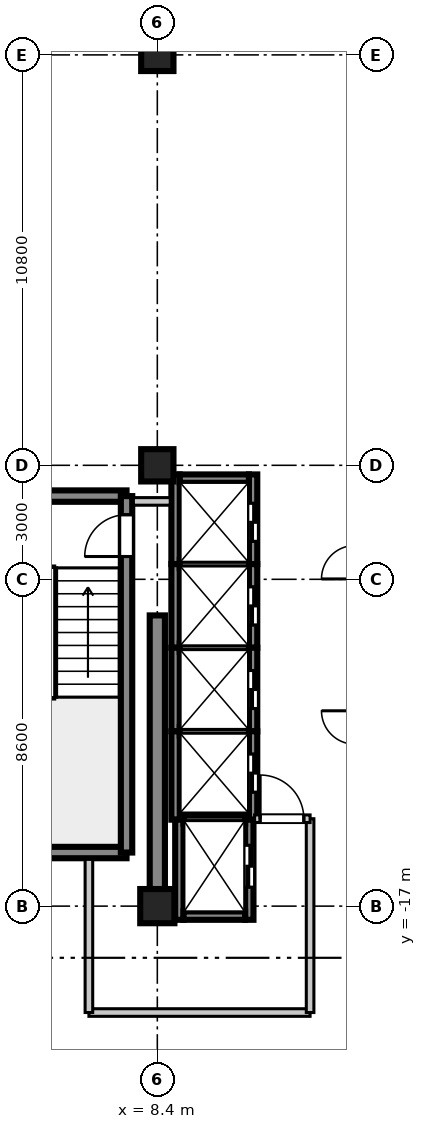
"""IFC4 building model, lengths in metres.
Left out: names, types, materials, properties, quantities, classifications, styles, units other than length and angle.
Written with IfcOpenShell. Run it as: python <this file> out.ifc"""

import sys

from ifc_helpers import new_model, si_unit, direction, frame, frame_2d, origin, origin_2d, place, context, subcontext, project, spatial, rectangle, extrude, source, transform, mapped, element, fill, save


model = new_model("IFC4")
c1 = context("Model", 3, precision=1e-05, world=origin(), true_north=direction((0.0, 1.0)))
c2 = subcontext(c1, "Body", "Model", "MODEL_VIEW")
j1 = project(units=[si_unit("LENGTHUNIT", "METRE"), si_unit("PLANEANGLEUNIT", "RADIAN")], contexts=[c1])
p1 = place(None, origin())
s1 = spatial("IfcSite", under=j1, at=p1, CompositionType="ELEMENT")
p2 = place(p1, origin())
s2 = spatial("IfcBuilding", under=s1, at=p2, CompositionType="ELEMENT")
p3 = place(p2, frame((0.0, 0.0, 266.3)))
s3 = spatial("IfcBuildingStorey", under=s2, at=p3, CompositionType="ELEMENT", Elevation=266.3)
m1 = source(origin(), c2, "Body", "SweptSolid", [
    extrude(rectangle(XDim=0.9, YDim=0.9, at=origin_2d()), origin(), (0.0, 0.0, 1.0), 3.705),
])
p4 = place(p3, frame((8.4, -17.0, 0.0), z_axis=(0.0, 0.0, 1.0), x_axis=(1.0, 0.0, 0.0)))
e1 = element("IfcColumn", 1, at=p4, inside=s3, PredefinedType="COLUMN", context=c2, shape_type="MappedRepresentation", body=[
    mapped(m1, transform((0.0, 0.0, 0.0), scale=1.0)),
])
m2 = source(origin(), c2, "Body", "SweptSolid", [
    extrude(rectangle(XDim=0.85, YDim=0.85, at=origin_2d()), origin(), (0.0, 0.0, 1.0), 3.705),
])
for number, where, z_axis, x_axis in (
    (2, (8.4, -5.4, 0.0), (0.0, 0.0, 1.0), (1.0, 0.0, 0.0)),
    (3, (8.4, 5.4, 0.0), (0.0, 0.0, 1.0), (1.0, 0.0, 0.0)),
):
    element("IfcColumn", number, at=place(p3, frame(where, z_axis=z_axis, x_axis=x_axis)), inside=s3, PredefinedType="PILASTER", context=c2, shape_type="MappedRepresentation", body=[
        mapped(m2, transform((0.0, 0.0, 0.0), scale=1.0)),
    ])
m3 = source(origin(), c2, "Body", "SweptSolid", [
    extrude(rectangle(XDim=7.65, YDim=0.4, at=frame_2d((3.825, 0.0))), origin(), (0.0, 0.0, 1.0), 3.45),
])
p5 = place(p3, frame((8.4, -17.0, 0.0), z_axis=(0.0, 0.0, 1.0), x_axis=(0.0, 1.0, 0.0)))
e4 = element("IfcWall", 4, at=p5, inside=s3, PredefinedType="SHEAR", context=c2, shape_type="MappedRepresentation", body=[
    mapped(m3, transform((0.0, 0.0, 0.0), scale=1.0)),
])
m4 = source(origin(), c2, "Body", "SweptSolid", [
    extrude(rectangle(XDim=3.98, YDim=0.3, at=frame_2d((1.99, 0.0))), origin(), (0.0, 0.0, 1.0), 3.45),
])
for number, where, z_axis, x_axis in (
    (5, (3.61, -15.59, 0.0), (0.0, 0.0, 1.0), (1.0, 0.0, 0.0)),
    (6, (3.61, -6.21, 0.0), (0.0, 0.0, 1.0), (1.0, 0.0, 0.0)),
):
    element("IfcWall", number, at=place(p3, frame(where, z_axis=z_axis, x_axis=x_axis)), inside=s3, PredefinedType="SHEAR", context=c2, shape_type="MappedRepresentation", body=[
        mapped(m4, transform((0.0, 0.0, 0.0), scale=1.0)),
    ])
m5 = source(origin(), c2, "Body", "SweptSolid", [
    extrude(rectangle(XDim=9.38, YDim=0.3, at=frame_2d((4.69, 0.0))), origin(), (0.0, 0.0, 1.0), 3.45),
])
p6 = place(p3, frame((7.59, -15.59, 0.0), z_axis=(0.0, 0.0, 1.0), x_axis=(0.0, 1.0, 0.0)))
e7 = element("IfcWall", 7, at=p6, inside=s3, PredefinedType="SHEAR", context=c2, shape_type="MappedRepresentation", body=[
    mapped(m5, transform((0.0, 0.0, 0.0), scale=1.0)),
])
p7 = place(p6, frame((7.79, 0.0, 0.0)))
e8 = element("IfcOpeningElement", 8, at=p7, cuts=e7, PredefinedType="OPENING", context=c2, shape_type="SweptSolid", body=[
    extrude(rectangle(XDim=1.1, YDim=2.15, at=frame_2d((0.55, 1.075))), frame((0.0, 0.16, 0.0), z_axis=(0.0, -1.0, 0.0), x_axis=(1.0, 0.0, 0.0)), (0.0, 0.0, 1.0), 0.32),
])
m6 = source(origin(), c2, "Body", "SweptSolid", [
    extrude(rectangle(XDim=2.36, YDim=0.22, at=frame_2d((1.18, 0.0))), origin(), (0.0, 0.0, 1.0), 3.45),
])
p8 = place(p3, frame((8.88, -8.0, 0.0), z_axis=(0.0, 0.0, 1.0), x_axis=(0.0, 1.0, 0.0)))
e9 = element("IfcWall", 9, at=p8, inside=s3, PredefinedType="SHEAR", context=c2, shape_type="MappedRepresentation", body=[
    mapped(m6, transform((0.0, 0.0, 0.0), scale=1.0)),
])
p9 = place(p3, frame((10.92, -8.0, 0.0), z_axis=(0.0, 0.0, 1.0), x_axis=(0.0, 1.0, 0.0)))
e10 = element("IfcWall", 10, at=p9, inside=s3, PredefinedType="SHEAR", context=c2, shape_type="MappedRepresentation", body=[
    mapped(m6, transform((0.0, 0.0, 0.0), scale=1.0)),
])
p10 = place(p9, frame((0.6, 0.0, 0.0)))
e11 = element("IfcOpeningElement", 11, at=p10, cuts=e10, PredefinedType="OPENING", context=c2, shape_type="SweptSolid", body=[
    extrude(rectangle(XDim=1.0, YDim=2.2, at=frame_2d((0.5, 1.1))), frame((0.0, 0.12, 0.0), z_axis=(0.0, -1.0, 0.0), x_axis=(1.0, 0.0, 0.0)), (0.0, 0.0, 1.0), 0.24),
])
m7 = source(origin(), c2, "Body", "SweptSolid", [
    extrude(rectangle(XDim=1.82, YDim=0.22, at=frame_2d((0.91, 0.0))), origin(), (0.0, 0.0, 1.0), 3.45),
])
p11 = place(p3, frame((8.99, -5.75, 0.0), z_axis=(0.0, 0.0, 1.0), x_axis=(1.0, 0.0, 0.0)))
e12 = element("IfcWall", 12, at=p11, inside=s3, PredefinedType="SHEAR", context=c2, shape_type="MappedRepresentation", body=[
    mapped(m7, transform((0.0, 0.0, 0.0), scale=1.0)),
])
m8 = source(origin(), c2, "Body", "SweptSolid", [
    extrude(rectangle(XDim=2.2, YDim=0.22, at=frame_2d((1.1, 0.0))), origin(), (0.0, 0.0, 1.0), 3.45),
])
p12 = place(p3, frame((8.88, -10.2, 0.0), z_axis=(0.0, 0.0, 1.0), x_axis=(0.0, 1.0, 0.0)))
e13 = element("IfcWall", 13, at=p12, inside=s3, PredefinedType="SHEAR", context=c2, shape_type="MappedRepresentation", body=[
    mapped(m8, transform((0.0, 0.0, 0.0), scale=1.0)),
])
p13 = place(p3, frame((10.92, -10.2, 0.0), z_axis=(0.0, 0.0, 1.0), x_axis=(0.0, 1.0, 0.0)))
e14 = element("IfcWall", 14, at=p13, inside=s3, PredefinedType="SHEAR", context=c2, shape_type="MappedRepresentation", body=[
    mapped(m8, transform((0.0, 0.0, 0.0), scale=1.0)),
])
p14 = place(p13, frame((0.6, 0.0, 0.0)))
e15 = element("IfcOpeningElement", 15, at=p14, cuts=e14, PredefinedType="OPENING", context=c2, shape_type="SweptSolid", body=[
    extrude(rectangle(XDim=1.0, YDim=2.2, at=frame_2d((0.5, 1.1))), frame((0.0, 0.12, 0.0), z_axis=(0.0, -1.0, 0.0), x_axis=(1.0, 0.0, 0.0)), (0.0, 0.0, 1.0), 0.24),
])
m9 = source(origin(), c2, "Body", "SweptSolid", [
    extrude(rectangle(XDim=1.82, YDim=0.22, at=frame_2d((0.91, 0.0))), origin(), (0.0, 0.0, 1.0), 3.75),
])
p15 = place(p3, frame((8.99, -8.0, 0.0), z_axis=(0.0, 0.0, 1.0), x_axis=(1.0, 0.0, 0.0)))
e16 = element("IfcWall", 16, at=p15, inside=s3, PredefinedType="SHEAR", context=c2, shape_type="MappedRepresentation", body=[
    mapped(m9, transform((0.0, 0.0, 0.0), scale=1.0)),
])
p16 = place(p3, frame((8.88, -12.4, 0.0), z_axis=(0.0, 0.0, 1.0), x_axis=(0.0, 1.0, 0.0)))
e17 = element("IfcWall", 17, at=p16, inside=s3, PredefinedType="SHEAR", context=c2, shape_type="MappedRepresentation", body=[
    mapped(m8, transform((0.0, 0.0, 0.0), scale=1.0)),
])
p17 = place(p3, frame((10.92, -12.4, 0.0), z_axis=(0.0, 0.0, 1.0), x_axis=(0.0, 1.0, 0.0)))
e18 = element("IfcWall", 18, at=p17, inside=s3, PredefinedType="SHEAR", context=c2, shape_type="MappedRepresentation", body=[
    mapped(m8, transform((0.0, 0.0, 0.0), scale=1.0)),
])
p18 = place(p17, frame((0.6, 0.0, 0.0)))
e19 = element("IfcOpeningElement", 19, at=p18, cuts=e18, PredefinedType="OPENING", context=c2, shape_type="SweptSolid", body=[
    extrude(rectangle(XDim=1.0, YDim=2.2, at=frame_2d((0.5, 1.1))), frame((0.0, 0.12, 0.0), z_axis=(0.0, -1.0, 0.0), x_axis=(1.0, 0.0, 0.0)), (0.0, 0.0, 1.0), 0.24),
])
p19 = place(p3, frame((8.99, -10.2, 0.0), z_axis=(0.0, 0.0, 1.0), x_axis=(1.0, 0.0, 0.0)))
e20 = element("IfcWall", 20, at=p19, inside=s3, PredefinedType="SHEAR", context=c2, shape_type="MappedRepresentation", body=[
    mapped(m9, transform((0.0, 0.0, 0.0), scale=1.0)),
])
m10 = source(origin(), c2, "Body", "SweptSolid", [
    extrude(rectangle(XDim=2.325, YDim=0.22, at=frame_2d((1.163, 0.0))), origin(), (0.0, 0.0, 1.0), 3.45),
])
p20 = place(p3, frame((8.88, -14.725, 0.0), z_axis=(0.0, 0.0, 1.0), x_axis=(0.0, 1.0, 0.0)))
e21 = element("IfcWall", 21, at=p20, inside=s3, PredefinedType="SHEAR", context=c2, shape_type="MappedRepresentation", body=[
    mapped(m10, transform((0.0, 0.0, 0.0), scale=1.0)),
])
p21 = place(p3, frame((10.92, -14.725, 0.0), z_axis=(0.0, 0.0, 1.0), x_axis=(0.0, 1.0, 0.0)))
e22 = element("IfcWall", 22, at=p21, inside=s3, PredefinedType="SHEAR", context=c2, shape_type="MappedRepresentation", body=[
    mapped(m10, transform((0.0, 0.0, 0.0), scale=1.0)),
])
p22 = place(p21, frame((0.725, 0.0, 0.0)))
e23 = element("IfcOpeningElement", 23, at=p22, cuts=e22, PredefinedType="OPENING", context=c2, shape_type="SweptSolid", body=[
    extrude(rectangle(XDim=1.0, YDim=2.2, at=frame_2d((0.5, 1.1))), frame((0.0, 0.12, 0.0), z_axis=(0.0, -1.0, 0.0), x_axis=(1.0, 0.0, 0.0)), (0.0, 0.0, 1.0), 0.24),
])
p23 = place(p3, frame((8.99, -12.4, 0.0), z_axis=(0.0, 0.0, 1.0), x_axis=(1.0, 0.0, 0.0)))
e24 = element("IfcWall", 24, at=p23, inside=s3, PredefinedType="SHEAR", context=c2, shape_type="MappedRepresentation", body=[
    mapped(m9, transform((0.0, 0.0, 0.0), scale=1.0)),
])
m11 = source(origin(), c2, "Body", "SweptSolid", [
    extrude(rectangle(XDim=2.635, YDim=0.22, at=frame_2d((1.317, 0.0))), origin(), (0.0, 0.0, 1.0), 3.45),
])
p24 = place(p3, frame((8.98, -17.36, 0.0), z_axis=(0.0, 0.0, 1.0), x_axis=(0.0, 1.0, 0.0)))
e25 = element("IfcWall", 25, at=p24, inside=s3, PredefinedType="SHEAR", context=c2, shape_type="MappedRepresentation", body=[
    mapped(m11, transform((0.0, 0.0, 0.0), scale=1.0)),
])
p25 = place(p3, frame((10.82, -17.36, 0.0), z_axis=(0.0, 0.0, 1.0), x_axis=(0.0, 1.0, 0.0)))
e26 = element("IfcWall", 26, at=p25, inside=s3, PredefinedType="SHEAR", context=c2, shape_type="MappedRepresentation", body=[
    mapped(m11, transform((0.0, 0.0, 0.0), scale=1.0)),
])
p26 = place(p25, frame((0.86, 0.0, 0.0)))
e27 = element("IfcOpeningElement", 27, at=p26, cuts=e26, PredefinedType="OPENING", context=c2, shape_type="SweptSolid", body=[
    extrude(rectangle(XDim=1.1, YDim=2.2, at=frame_2d((0.55, 1.1))), frame((0.0, 0.12, 0.0), z_axis=(0.0, -1.0, 0.0), x_axis=(1.0, 0.0, 0.0)), (0.0, 0.0, 1.0), 0.24),
])
m12 = source(origin(), c2, "Body", "SweptSolid", [
    extrude(rectangle(XDim=1.62, YDim=0.22, at=frame_2d((0.81, 0.0))), origin(), (0.0, 0.0, 1.0), 3.45),
])
p27 = place(p3, frame((9.09, -17.25, 0.0), z_axis=(0.0, 0.0, 1.0), x_axis=(1.0, 0.0, 0.0)))
e28 = element("IfcWall", 28, at=p27, inside=s3, PredefinedType="SHEAR", context=c2, shape_type="MappedRepresentation", body=[
    mapped(m12, transform((0.0, 0.0, 0.0), scale=1.0)),
])
m13 = source(origin(), c2, "Body", "SweptSolid", [
    extrude(rectangle(XDim=1.62, YDim=0.22, at=frame_2d((0.81, 0.0))), origin(), (0.0, 0.0, 1.0), 3.75),
])
p28 = place(p3, frame((9.09, -14.725, 0.0), z_axis=(0.0, 0.0, 1.0), x_axis=(1.0, 0.0, 0.0)))
e29 = element("IfcWall", 29, at=p28, inside=s3, PredefinedType="SHEAR", context=c2, shape_type="MappedRepresentation", body=[
    mapped(m13, transform((0.0, 0.0, 0.0), scale=1.0)),
])
m14 = source(origin(), c2, "Body", "SweptSolid", [
    extrude(rectangle(XDim=5.82, YDim=0.2, at=frame_2d((2.91, 0.0))), origin(), (0.0, 0.0, 1.0), 2.79),
])
p29 = place(p3, frame((6.6, -19.8, 0.0), z_axis=(0.0, 0.0, 1.0), x_axis=(1.0, 0.0, 0.0)))
e30 = element("IfcWall", 30, at=p29, inside=s3, PredefinedType="PARTITIONING", context=c2, shape_type="MappedRepresentation", body=[
    mapped(m14, transform((0.0, 0.0, 0.0), scale=1.0)),
])
m15 = source(origin(), c2, "Body", "SweptSolid", [
    extrude(rectangle(XDim=4.03, YDim=0.2, at=frame_2d((2.015, 0.0))), origin(), (0.0, 0.0, 1.0), 2.79),
])
p30 = place(p3, frame((6.6, -19.8, 0.0), z_axis=(0.0, 0.0, 1.0), x_axis=(0.0, 1.0, 0.0)))
e31 = element("IfcWall", 31, at=p30, inside=s3, PredefinedType="PARTITIONING", context=c2, shape_type="MappedRepresentation", body=[
    mapped(m15, transform((0.0, 0.0, 0.0), scale=1.0)),
])
m16 = source(origin(), c2, "Body", "SweptSolid", [
    extrude(rectangle(XDim=5.1, YDim=0.2, at=frame_2d((2.55, 0.0))), origin(), (0.0, 0.0, 1.0), 2.79),
])
p31 = place(p3, frame((12.42, -19.8, 0.0), z_axis=(0.0, 0.0, 1.0), x_axis=(0.0, 1.0, 0.0)))
e32 = element("IfcWall", 32, at=p31, inside=s3, PredefinedType="PARTITIONING", context=c2, shape_type="MappedRepresentation", body=[
    mapped(m16, transform((0.0, 0.0, 0.0), scale=1.0)),
])
m17 = source(origin(), c2, "Body", "SweptSolid", [
    extrude(rectangle(XDim=1.46, YDim=0.2, at=frame_2d((0.73, 0.0))), origin(), (0.0, 0.0, 1.0), 2.79),
])
p32 = place(p3, frame((10.96, -14.7, 0.0), z_axis=(0.0, 0.0, 1.0), x_axis=(1.0, 0.0, 0.0)))
e33 = element("IfcWall", 33, at=p32, inside=s3, PredefinedType="PARTITIONING", context=c2, shape_type="MappedRepresentation", body=[
    mapped(m17, transform((0.0, 0.0, 0.0), scale=1.0)),
])
p33 = place(p32, frame((0.145, 0.0, 0.0)))
e34 = element("IfcOpeningElement", 34, at=p33, cuts=e33, PredefinedType="OPENING", context=c2, shape_type="SweptSolid", body=[
    extrude(rectangle(XDim=1.15, YDim=2.15, at=frame_2d((0.575, 1.075))), frame((0.0, 0.11, 0.0), z_axis=(0.0, -1.0, 0.0), x_axis=(1.0, 0.0, 0.0)), (0.0, 0.0, 1.0), 0.22),
])
m18 = source(origin(), c2, "Body", "SweptSolid", [
    extrude(rectangle(XDim=0.97, YDim=0.2, at=frame_2d((0.485, 0.0))), origin(), (0.0, 0.0, 1.0), 2.79),
])
p34 = place(p3, frame((7.77, -6.35, 0.0), z_axis=(0.0, 0.0, 1.0), x_axis=(1.0, 0.0, 0.0)))
e35 = element("IfcWall", 35, at=p34, inside=s3, PredefinedType="PARTITIONING", context=c2, shape_type="MappedRepresentation", body=[
    mapped(m18, transform((0.0, 0.0, 0.0), scale=1.0)),
])
m19 = source(origin(), c2, "Body", "SweptSolid", [
    extrude(rectangle(XDim=1.1, YDim=2.15, at=frame_2d((0.55, 1.075))), frame((0.0, 0.025, 0.0), z_axis=(0.0, -1.0, 0.0), x_axis=(1.0, 0.0, 0.0)), (0.0, 0.0, 1.0), 0.05),
])
p35 = place(p7, origin())
e36 = element("IfcDoor", 36, at=p35, inside=s3, OperationType="SINGLE_SWING_LEFT", PredefinedType="DOOR", context=c2, shape_type="MappedRepresentation", body=[
    mapped(m19, transform((0.0, 0.0, 0.0), scale=1.0)),
])
fill(e8, e36)
m20 = source(origin(), c2, "Body", "SweptSolid", [
    extrude(rectangle(XDim=1.0, YDim=2.2, at=frame_2d((0.5, 1.1))), frame((0.0, 0.025, 0.0), z_axis=(0.0, -1.0, 0.0), x_axis=(1.0, 0.0, 0.0)), (0.0, 0.0, 1.0), 0.05),
])
p36 = place(p10, frame((1.0, 0.0, 0.0), z_axis=(0.0, 0.0, 1.0), x_axis=(-1.0, 0.0, 0.0)))
e37 = element("IfcDoor", 37, at=p36, inside=s3, OperationType="DOUBLE_DOOR_SLIDING", PredefinedType="DOOR", context=c2, shape_type="MappedRepresentation", body=[
    mapped(m20, transform((0.0, 0.0, 0.0), scale=1.0)),
])
fill(e11, e37)
p37 = place(p14, frame((1.0, 0.0, 0.0), z_axis=(0.0, 0.0, 1.0), x_axis=(-1.0, 0.0, 0.0)))
e38 = element("IfcDoor", 38, at=p37, inside=s3, OperationType="DOUBLE_DOOR_SLIDING", PredefinedType="DOOR", context=c2, shape_type="MappedRepresentation", body=[
    mapped(m20, transform((0.0, 0.0, 0.0), scale=1.0)),
])
fill(e15, e38)
p38 = place(p18, frame((1.0, 0.0, 0.0), z_axis=(0.0, 0.0, 1.0), x_axis=(-1.0, 0.0, 0.0)))
e39 = element("IfcDoor", 39, at=p38, inside=s3, OperationType="DOUBLE_DOOR_SLIDING", PredefinedType="DOOR", context=c2, shape_type="MappedRepresentation", body=[
    mapped(m20, transform((0.0, 0.0, 0.0), scale=1.0)),
])
fill(e19, e39)
p39 = place(p22, frame((1.0, 0.0, 0.0), z_axis=(0.0, 0.0, 1.0), x_axis=(-1.0, 0.0, 0.0)))
e40 = element("IfcDoor", 40, at=p39, inside=s3, OperationType="DOUBLE_DOOR_SLIDING", PredefinedType="DOOR", context=c2, shape_type="MappedRepresentation", body=[
    mapped(m20, transform((0.0, 0.0, 0.0), scale=1.0)),
])
fill(e23, e40)
m21 = source(origin(), c2, "Body", "SweptSolid", [
    extrude(rectangle(XDim=1.1, YDim=2.2, at=frame_2d((0.55, 1.1))), frame((0.0, 0.025, 0.0), z_axis=(0.0, -1.0, 0.0), x_axis=(1.0, 0.0, 0.0)), (0.0, 0.0, 1.0), 0.05),
])
p40 = place(p26, frame((1.1, 0.0, 0.0), z_axis=(0.0, 0.0, 1.0), x_axis=(-1.0, 0.0, 0.0)))
e41 = element("IfcDoor", 41, at=p40, inside=s3, OperationType="DOUBLE_DOOR_SLIDING", PredefinedType="DOOR", context=c2, shape_type="MappedRepresentation", body=[
    mapped(m21, transform((0.0, 0.0, 0.0), scale=1.0)),
])
fill(e27, e41)
m22 = source(origin(), c2, "Body", "SweptSolid", [
    extrude(rectangle(XDim=1.15, YDim=2.15, at=frame_2d((0.575, 1.075))), frame((0.0, 0.025, 0.0), z_axis=(0.0, -1.0, 0.0), x_axis=(1.0, 0.0, 0.0)), (0.0, 0.0, 1.0), 0.05),
])
p41 = place(p33, origin())
e42 = element("IfcDoor", 42, at=p41, inside=s3, OperationType="SINGLE_SWING_LEFT", PredefinedType="DOOR", context=c2, shape_type="MappedRepresentation", body=[
    mapped(m22, transform((0.0, 0.0, 0.0), scale=1.0)),
])
fill(e34, e42)
save(model, sys.argv[1])
